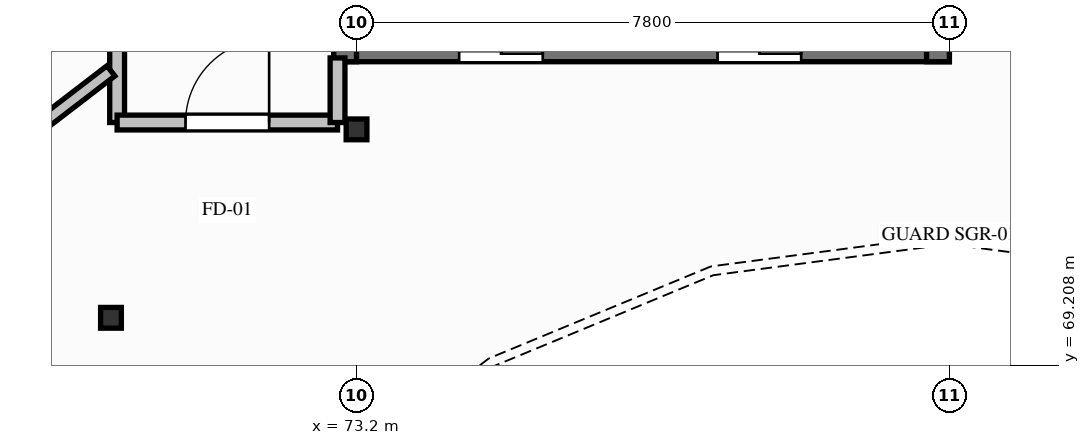
"""IFC4 building model, lengths in metres.
Left out: names, types, materials, properties, quantities, classifications, styles, units other than length and angle.
Written with IfcOpenShell. Run it as: python <this file> out.ifc"""

import sys

from ifc_helpers import new_model, si_unit, direction, frame, frame_2d, origin, origin_2d, place, context, subcontext, project, spatial, rectangle, hollow_circle, extrude, element, fill, save


model = new_model("IFC4")
c1 = context("Model", 3, precision=1e-05, world=origin(), true_north=direction((0.0, 1.0)))
c2 = subcontext(c1, "Body", "Model", "MODEL_VIEW")
j1 = project(units=[si_unit("LENGTHUNIT", "METRE"), si_unit("PLANEANGLEUNIT", "RADIAN")], contexts=[c1])
p1 = place(None, origin())
s1 = spatial("IfcSite", under=j1, at=p1, CompositionType="ELEMENT")
p2 = place(p1, origin())
s2 = spatial("IfcBuilding", under=s1, at=p2, CompositionType="ELEMENT")
p3 = place(p2, frame((0.0, 0.0, 9.0)))
s3 = spatial("IfcBuildingStorey", under=s2, at=p3, CompositionType="ELEMENT", Elevation=9.0)
p4 = place(p3, frame((72.9, 73.35, 0.0), z_axis=(0.0, 0.0, 1.0), x_axis=(1.0, 0.0, 0.0)))
e1 = element("IfcWall", 1, at=p4, inside=s3, PredefinedType="SHEAR", context=c2, shape_type="SweptSolid", body=[
    extrude(rectangle(XDim=8.1, YDim=0.3, at=frame_2d((4.05, 0.0))), origin(), (0.0, 0.0, 1.0), 4.2),
])
p5 = place(p4, frame((1.65, 0.0, 0.0)))
e2 = element("IfcOpeningElement", 2, at=p5, cuts=e1, PredefinedType="OPENING", context=c2, shape_type="SweptSolid", body=[
    extrude(rectangle(XDim=1.1, YDim=2.1, at=frame_2d((0.55, 1.05))), frame((0.0, 0.16, 0.0), z_axis=(0.0, -1.0, 0.0), x_axis=(1.0, 0.0, 0.0)), (0.0, 0.0, 1.0), 0.32),
])
p6 = place(p4, frame((5.05, 0.0, 0.0)))
e3 = element("IfcOpeningElement", 3, at=p6, cuts=e1, PredefinedType="OPENING", context=c2, shape_type="SweptSolid", body=[
    extrude(rectangle(XDim=1.1, YDim=2.1, at=frame_2d((0.55, 1.05))), frame((0.0, 0.16, 0.0), z_axis=(0.0, -1.0, 0.0), x_axis=(1.0, 0.0, 0.0)), (0.0, 0.0, 1.0), 0.32),
])
p7 = place(p3, frame((73.05, 73.2, 0.0), z_axis=(0.0, 0.0, 1.0), x_axis=(0.0, 1.0, 0.0)))
e4 = element("IfcWall", 4, at=p7, inside=s3, PredefinedType="SHEAR", context=c2, shape_type="SweptSolid", body=[
    extrude(rectangle(XDim=7.2, YDim=0.3, at=frame_2d((3.6, 0.0))), origin(), (0.0, 0.0, 1.0), 4.2),
])
p8 = place(p7, frame((4.2, 0.0, 0.0)))
e5 = element("IfcOpeningElement", 5, at=p8, cuts=e4, PredefinedType="OPENING", context=c2, shape_type="SweptSolid", body=[
    extrude(rectangle(XDim=1.1, YDim=2.15, at=frame_2d((0.55, 1.075))), frame((0.0, 0.16, 0.0), z_axis=(0.0, -1.0, 0.0), x_axis=(1.0, 0.0, 0.0)), (0.0, 0.0, 1.0), 0.32),
])
p9 = place(p3, frame((80.85, 73.2, 0.0), z_axis=(0.0, 0.0, 1.0), x_axis=(0.0, 1.0, 0.0)))
e6 = element("IfcWall", 6, at=p9, inside=s3, PredefinedType="SHEAR", context=c2, shape_type="SweptSolid", body=[
    extrude(rectangle(XDim=7.2, YDim=0.3, at=frame_2d((3.6, 0.0))), origin(), (0.0, 0.0, 1.0), 4.2),
])
for number, where, z_axis, x_axis in (
    (7, (73.2, 72.31, 0.0), (0.0, 0.0, 1.0), (1.0, 0.0, 0.0)),
    (8, (69.969, 69.831, 0.0), (0.0, 0.0, 1.0), (1.0, 0.0, 0.0)),
):
    element("IfcColumn", number, at=place(p3, frame(where, z_axis=z_axis, x_axis=x_axis)), inside=s3, PredefinedType="COLUMN", context=c2, shape_type="SweptSolid", body=[
        extrude(hollow_circle(Radius=0.136, WallThickness=0.012, at=origin_2d()), origin(), (0.0, 0.0, 1.0), 4.2),
    ])
p10 = place(p3, frame((70.05, 72.4, 0.0), z_axis=(0.0, 0.0, 1.0), x_axis=(0.0, 1.0, 0.0)))
e9 = element("IfcWall", 9, at=p10, inside=s3, PredefinedType="PARTITIONING", context=c2, shape_type="SweptSolid", body=[
    extrude(rectangle(XDim=7.95, YDim=0.195, at=frame_2d((3.975, 0.0))), origin(), (0.0, 0.0, 1.0), 3.538),
])
p11 = place(p3, frame((70.05, 72.4, 0.0), z_axis=(0.0, 0.0, 1.0), x_axis=(1.0, 0.0, 0.0)))
e10 = element("IfcWall", 10, at=p11, inside=s3, PredefinedType="PARTITIONING", context=c2, shape_type="SweptSolid", body=[
    extrude(rectangle(XDim=2.9, YDim=0.195, at=frame_2d((1.45, 0.0))), origin(), (0.0, 0.0, 1.0), 3.568),
])
p12 = place(p11, frame((0.9, 0.0, 0.0)))
e11 = element("IfcOpeningElement", 11, at=p12, cuts=e10, PredefinedType="OPENING", context=c2, shape_type="SweptSolid", body=[
    extrude(rectangle(XDim=1.1, YDim=2.15, at=frame_2d((0.55, 1.075))), frame((0.0, 0.107, 0.0), z_axis=(0.0, -1.0, 0.0), x_axis=(1.0, 0.0, 0.0)), (0.0, 0.0, 1.0), 0.215),
])
p13 = place(p3, frame((72.95, 72.4, 0.0), z_axis=(0.0, 0.0, 1.0), x_axis=(0.0, 1.0, 0.0)))
e12 = element("IfcWall", 12, at=p13, inside=s3, PredefinedType="PARTITIONING", context=c2, shape_type="SweptSolid", body=[
    extrude(rectangle(XDim=0.85, YDim=0.195, at=frame_2d((0.425, 0.0))), origin(), (0.0, 0.0, 1.0), 3.568),
])
p14 = place(p3, frame((69.969, 73.079, 0.0), z_axis=(0.0, 0.0, 1.0), x_axis=(-0.7933756116, -0.608732403374, 0.0)))
e13 = element("IfcWall", 13, at=p14, inside=s3, PredefinedType="PARTITIONING", context=c2, shape_type="SweptSolid", body=[
    extrude(rectangle(XDim=2.317, YDim=0.17, at=frame_2d((1.158, 0.0))), origin(), (0.0, 0.0, 1.0), 3.568),
])
p15 = place(p12, origin())
e14 = element("IfcDoor", 14, at=p15, inside=s3, OperationType="SINGLE_SWING_RIGHT", PredefinedType="DOOR", context=c2, shape_type="SweptSolid", body=[
    extrude(rectangle(XDim=1.1, YDim=2.15, at=frame_2d((0.55, 1.075))), frame((0.0, 0.025, 0.0), z_axis=(0.0, -1.0, 0.0), x_axis=(1.0, 0.0, 0.0)), (0.0, 0.0, 1.0), 0.05),
])
fill(e11, e14)
save(model, sys.argv[1])
